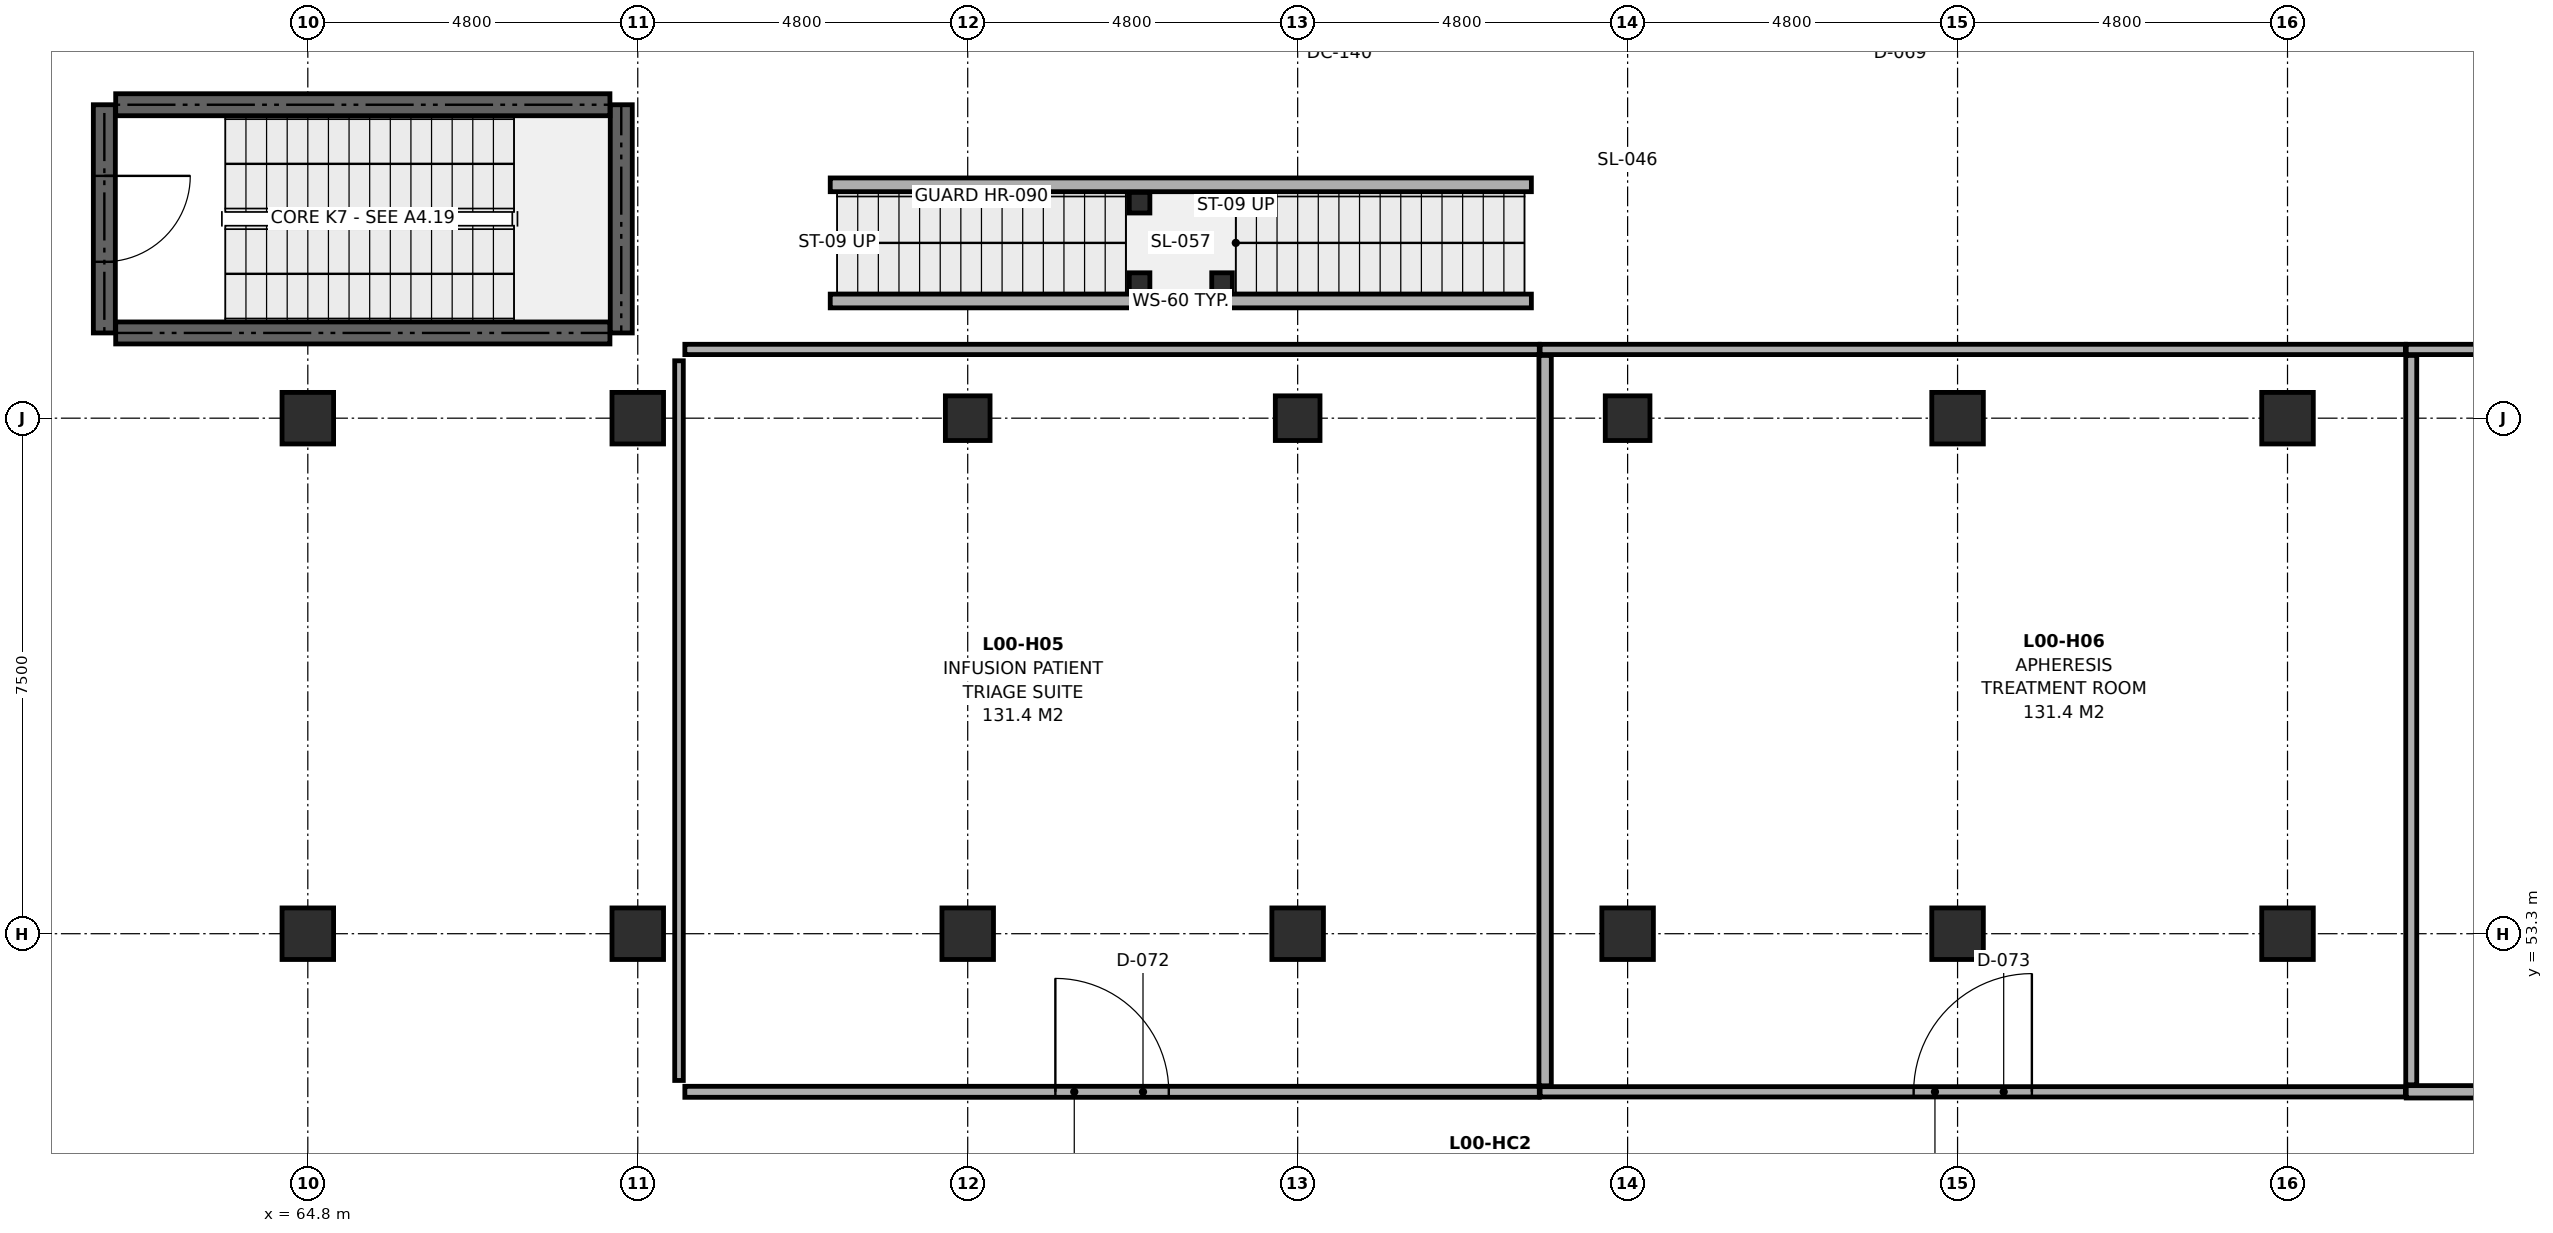
"""IFC4 building model, lengths in metres.
Left out: names, types, materials, properties, quantities, classifications, styles, units other than length and angle.
Written with IfcOpenShell. Run it as: python <this file> out.ifc"""

import sys

from ifc_helpers import new_model, si_unit, direction, frame, frame_2d, origin, origin_2d, place, context, subcontext, project, spatial, rectangle, circle, i_section, extrude, element, fill, save


model = new_model("IFC4")
c1 = context("Model", 3, precision=1e-05, world=origin(), true_north=direction((0.0, 1.0)))
c2 = subcontext(c1, "Body", "Model", "MODEL_VIEW")
j1 = project(units=[si_unit("LENGTHUNIT", "METRE"), si_unit("PLANEANGLEUNIT", "RADIAN")], contexts=[c1])
p1 = place(None, origin())
s1 = spatial("IfcSite", under=j1, at=p1, CompositionType="ELEMENT")
p2 = place(p1, origin())
s2 = spatial("IfcBuilding", under=s1, at=p2, CompositionType="ELEMENT")
p3 = place(p2, origin())
s3 = spatial("IfcBuildingStorey", under=s2, at=p3, CompositionType="ELEMENT", Elevation=0.0)
for number, where, z_axis, x_axis in (
    (1, (64.8, 53.3, 0.0), (0.0, 0.0, 1.0), (1.0, 0.0, 0.0)),
    (2, (64.8, 60.8, 0.0), (0.0, 0.0, 1.0), (1.0, 0.0, 0.0)),
    (3, (69.6, 53.3, 0.0), (0.0, 0.0, 1.0), (1.0, 0.0, 0.0)),
    (4, (69.6, 60.8, 0.0), (0.0, 0.0, 1.0), (1.0, 0.0, 0.0)),
    (5, (74.4, 53.3, 0.0), (0.0, 0.0, 1.0), (1.0, 0.0, 0.0)),
    (6, (79.2, 53.3, 0.0), (0.0, 0.0, 1.0), (1.0, 0.0, 0.0)),
    (7, (84.0, 53.3, 0.0), (0.0, 0.0, 1.0), (1.0, 0.0, 0.0)),
    (8, (88.8, 53.3, 0.0), (0.0, 0.0, 1.0), (1.0, 0.0, 0.0)),
    (9, (88.8, 60.8, 0.0), (0.0, 0.0, 1.0), (1.0, 0.0, 0.0)),
    (10, (93.6, 53.3, 0.0), (0.0, 0.0, 1.0), (1.0, 0.0, 0.0)),
    (11, (93.6, 60.8, 0.0), (0.0, 0.0, 1.0), (1.0, 0.0, 0.0)),
):
    element("IfcColumn", number, at=place(p3, frame(where, z_axis=z_axis, x_axis=x_axis)), inside=s3, PredefinedType="COLUMN", context=c2, shape_type="SweptSolid", body=[
        extrude(circle(Radius=0.375, at=origin_2d()), origin(), (0.0, 0.0, 1.0), 4.7),
    ])
for number, where, z_axis, x_axis in (
    (12, (74.4, 60.8, 0.0), (0.0, 0.0, 1.0), (1.0, 0.0, 0.0)),
    (13, (79.2, 60.8, 0.0), (0.0, 0.0, 1.0), (1.0, 0.0, 0.0)),
    (14, (84.0, 60.8, 0.0), (0.0, 0.0, 1.0), (1.0, 0.0, 0.0)),
):
    element("IfcColumn", number, at=place(p3, frame(where, z_axis=z_axis, x_axis=x_axis)), inside=s3, PredefinedType="COLUMN", context=c2, shape_type="SweptSolid", body=[
        extrude(circle(Radius=0.325, at=origin_2d()), origin(), (0.0, 0.0, 1.0), 4.7),
    ])
p4 = place(p3, frame((62.005, 62.04, 0.0), z_axis=(0.0, 0.0, 1.0), x_axis=(1.0, 0.0, 0.0)))
e15 = element("IfcWall", 15, at=p4, inside=s3, PredefinedType="SHEAR", context=c2, shape_type="SweptSolid", body=[
    extrude(rectangle(XDim=7.19, YDim=0.32, at=frame_2d((3.595, 0.0))), origin(), (0.0, 0.0, 1.0), 4.7),
])
p5 = place(p3, frame((69.36, 62.04, 0.0), z_axis=(0.0, 0.0, 1.0), x_axis=(0.0, 1.0, 0.0)))
e16 = element("IfcWall", 16, at=p5, inside=s3, PredefinedType="SHEAR", context=c2, shape_type="SweptSolid", body=[
    extrude(rectangle(XDim=3.32, YDim=0.32, at=frame_2d((1.66, 0.0))), origin(), (0.0, 0.0, 1.0), 4.7),
])
p6 = place(p3, frame((69.195, 65.36, 0.0), z_axis=(0.0, 0.0, 1.0), x_axis=(-1.0, 0.0, 0.0)))
e17 = element("IfcWall", 17, at=p6, inside=s3, PredefinedType="SHEAR", context=c2, shape_type="SweptSolid", body=[
    extrude(rectangle(XDim=7.19, YDim=0.32, at=frame_2d((3.595, 0.0))), origin(), (0.0, 0.0, 1.0), 4.7),
])
p7 = place(p3, frame((61.84, 65.36, 0.0), z_axis=(0.0, 0.0, 1.0), x_axis=(0.0, -1.0, 0.0)))
e18 = element("IfcWall", 18, at=p7, inside=s3, PredefinedType="SHEAR", context=c2, shape_type="SweptSolid", body=[
    extrude(rectangle(XDim=3.32, YDim=0.32, at=frame_2d((1.66, 0.0))), origin(), (0.0, 0.0, 1.0), 4.7),
])
p8 = place(p7, frame((1.035, 0.0, 0.0)))
e19 = element("IfcOpeningElement", 19, at=p8, cuts=e18, PredefinedType="OPENING", context=c2, shape_type="SweptSolid", body=[
    extrude(rectangle(XDim=1.25, YDim=2.2, at=frame_2d((0.625, 1.1))), frame((0.0, 0.172, 0.0), z_axis=(0.0, -1.0, 0.0), x_axis=(1.0, 0.0, 0.0)), (0.0, 0.0, 1.0), 0.344),
])
for number, where, z_axis, x_axis in (
    (20, (72.4, 62.505, 0.0), (0.0, 0.0, 1.0), (1.0, 0.0, 0.0)),
    (21, (72.4, 64.195, 0.0), (0.0, 0.0, 1.0), (1.0, 0.0, 0.0)),
):
    element("IfcWall", number, at=place(p3, frame(where, z_axis=z_axis, x_axis=x_axis)), inside=s3, PredefinedType="PARTITIONING", context=c2, shape_type="SweptSolid", body=[
        extrude(rectangle(XDim=10.2, YDim=0.2, at=frame_2d((5.1, 0.0))), origin(), (0.0, 0.0, 1.0), 2.3),
    ])
for number, where, z_axis, x_axis in (
    (22, (76.9, 62.765, 0.0), (0.0, 0.0, 1.0), (1.0, 0.0, 0.0)),
    (23, (78.1, 62.765, 0.0), (0.0, 0.0, 1.0), (1.0, 0.0, 0.0)),
    (24, (78.1, 63.935, 0.0), (0.0, 0.0, 1.0), (1.0, 0.0, 0.0)),
    (25, (76.9, 63.935, 0.0), (0.0, 0.0, 1.0), (1.0, 0.0, 0.0)),
):
    element("IfcColumn", number, at=place(p3, frame(where, z_axis=z_axis, x_axis=x_axis)), inside=s3, PredefinedType="COLUMN", context=c2, shape_type="SweptSolid", body=[
        extrude(i_section(OverallWidth=0.3, OverallDepth=0.3, WebThickness=0.011, FlangeThickness=0.019, FilletRadius=0.027, at=origin_2d()), origin(), (0.0, 0.0, 1.0), 2.3),
    ])
p9 = place(p3, frame((70.285, 51.0, 0.0), z_axis=(0.0, 0.0, 1.0), x_axis=(1.0, 0.0, 0.0)))
e26 = element("IfcWall", 26, at=p9, inside=s3, PredefinedType="PARTITIONING", context=c2, shape_type="SweptSolid", body=[
    extrude(rectangle(XDim=12.43, YDim=0.16, at=frame_2d((6.215, 0.0))), origin(), (0.0, 0.0, 1.0), 3.985),
])
p10 = place(p9, frame((5.39, 0.0, 0.0)))
e27 = element("IfcOpeningElement", 27, at=p10, cuts=e26, PredefinedType="OPENING", context=c2, shape_type="SweptSolid", body=[
    extrude(rectangle(XDim=1.65, YDim=2.32, at=frame_2d((0.825, 1.16))), frame((0.0, 0.092, 0.0), z_axis=(0.0, -1.0, 0.0), x_axis=(1.0, 0.0, 0.0)), (0.0, 0.0, 1.0), 0.184),
])
p11 = place(p3, frame((82.727, 51.0, 0.0), z_axis=(0.0, 0.0, 1.0), x_axis=(1.0, 0.0, 0.0)))
e28 = element("IfcWall", 28, at=p11, inside=s3, PredefinedType="PARTITIONING", context=c2, shape_type="SweptSolid", body=[
    extrude(rectangle(XDim=12.588, YDim=0.15, at=frame_2d((6.294, 0.0))), origin(), (0.0, 0.0, 1.0), 3.985),
])
p12 = place(p11, frame((5.434, 0.0, 0.0)))
e29 = element("IfcOpeningElement", 29, at=p12, cuts=e28, PredefinedType="OPENING", context=c2, shape_type="SweptSolid", body=[
    extrude(rectangle(XDim=1.72, YDim=2.34, at=frame_2d((0.86, 1.17))), frame((0.0, 0.087, 0.0), z_axis=(0.0, -1.0, 0.0), x_axis=(1.0, 0.0, 0.0)), (0.0, 0.0, 1.0), 0.174),
])
p13 = place(p3, frame((95.327, 51.0, 0.0), z_axis=(0.0, 0.0, 1.0), x_axis=(1.0, 0.0, 0.0)))
e30 = element("IfcWall", 30, at=p13, inside=s3, PredefinedType="PARTITIONING", context=c2, shape_type="SweptSolid", body=[
    extrude(rectangle(XDim=12.388, YDim=0.18, at=frame_2d((6.194, 0.0))), origin(), (0.0, 0.0, 1.0), 3.985),
])
p14 = place(p13, frame((5.504, 0.0, 0.0)))
e31 = element("IfcOpeningElement", 31, at=p14, cuts=e30, PredefinedType="OPENING", context=c2, shape_type="SweptSolid", body=[
    extrude(rectangle(XDim=1.38, YDim=2.3, at=frame_2d((0.69, 1.15))), frame((0.0, 0.102, 0.0), z_axis=(0.0, -1.0, 0.0), x_axis=(1.0, 0.0, 0.0)), (0.0, 0.0, 1.0), 0.204),
])
p15 = place(p3, frame((70.285, 61.8, 0.0), z_axis=(0.0, 0.0, 1.0), x_axis=(1.0, 0.0, 0.0)))
e32 = element("IfcWall", 32, at=p15, inside=s3, PredefinedType="PARTITIONING", context=c2, shape_type="SweptSolid", body=[
    extrude(rectangle(XDim=12.43, YDim=0.15, at=frame_2d((6.215, 0.0))), origin(), (0.0, 0.0, 1.0), 4.7),
])
p16 = place(p3, frame((82.727, 61.8, 0.0), z_axis=(0.0, 0.0, 1.0), x_axis=(1.0, 0.0, 0.0)))
e33 = element("IfcWall", 33, at=p16, inside=s3, PredefinedType="PARTITIONING", context=c2, shape_type="SweptSolid", body=[
    extrude(rectangle(XDim=12.588, YDim=0.15, at=frame_2d((6.294, 0.0))), origin(), (0.0, 0.0, 1.0), 3.985),
])
p17 = place(p3, frame((95.327, 61.8, 0.0), z_axis=(0.0, 0.0, 1.0), x_axis=(1.0, 0.0, 0.0)))
e34 = element("IfcWall", 34, at=p17, inside=s3, PredefinedType="PARTITIONING", context=c2, shape_type="SweptSolid", body=[
    extrude(rectangle(XDim=12.571, YDim=0.15, at=frame_2d((6.286, 0.0))), origin(), (0.0, 0.0, 1.0), 4.035),
])
p18 = place(p3, frame((70.2, 51.165, 0.0), z_axis=(0.0, 0.0, 1.0), x_axis=(0.0, 1.0, 0.0)))
e35 = element("IfcWall", 35, at=p18, inside=s3, PredefinedType="PARTITIONING", context=c2, shape_type="SweptSolid", body=[
    extrude(rectangle(XDim=10.47, YDim=0.125, at=frame_2d((5.235, 0.0))), origin(), (0.0, 0.0, 1.0), 4.085),
])
p19 = place(p3, frame((82.8, 51.087, 0.0), z_axis=(0.0, 0.0, 1.0), x_axis=(0.0, 1.0, 0.0)))
e36 = element("IfcWall", 36, at=p19, inside=s3, PredefinedType="PARTITIONING", context=c2, shape_type="SweptSolid", body=[
    extrude(rectangle(XDim=10.626, YDim=0.18, at=frame_2d((5.313, 0.0))), origin(), (0.0, 0.0, 1.0), 4.035),
])
p20 = place(p3, frame((95.4, 51.102, 0.0), z_axis=(0.0, 0.0, 1.0), x_axis=(0.0, 1.0, 0.0)))
e37 = element("IfcWall", 37, at=p20, inside=s3, PredefinedType="PARTITIONING", context=c2, shape_type="SweptSolid", body=[
    extrude(rectangle(XDim=10.611, YDim=0.16, at=frame_2d((5.305, 0.0))), origin(), (0.0, 0.0, 1.0), 4.085),
])
p21 = place(p8, origin())
e38 = element("IfcDoor", 38, at=p21, inside=s3, OperationType="SINGLE_SWING_LEFT", PredefinedType="DOOR", context=c2, shape_type="SweptSolid", body=[
    extrude(rectangle(XDim=1.25, YDim=2.2, at=frame_2d((0.625, 1.1))), frame((0.0, 0.025, 0.0), z_axis=(0.0, -1.0, 0.0), x_axis=(1.0, 0.0, 0.0)), (0.0, 0.0, 1.0), 0.05),
])
fill(e19, e38)
p22 = place(p10, origin())
e39 = element("IfcDoor", 39, at=p22, inside=s3, OperationType="SINGLE_SWING_LEFT", PredefinedType="DOOR", context=c2, shape_type="SweptSolid", body=[
    extrude(rectangle(XDim=1.65, YDim=2.32, at=frame_2d((0.825, 1.16))), frame((0.0, 0.025, 0.0), z_axis=(0.0, -1.0, 0.0), x_axis=(1.0, 0.0, 0.0)), (0.0, 0.0, 1.0), 0.05),
])
fill(e27, e39)
p23 = place(p12, origin())
e40 = element("IfcDoor", 40, at=p23, inside=s3, OperationType="SINGLE_SWING_RIGHT", PredefinedType="DOOR", context=c2, shape_type="SweptSolid", body=[
    extrude(rectangle(XDim=1.72, YDim=2.34, at=frame_2d((0.86, 1.17))), frame((0.0, 0.025, 0.0), z_axis=(0.0, -1.0, 0.0), x_axis=(1.0, 0.0, 0.0)), (0.0, 0.0, 1.0), 0.05),
])
fill(e29, e40)
save(model, sys.argv[1])
